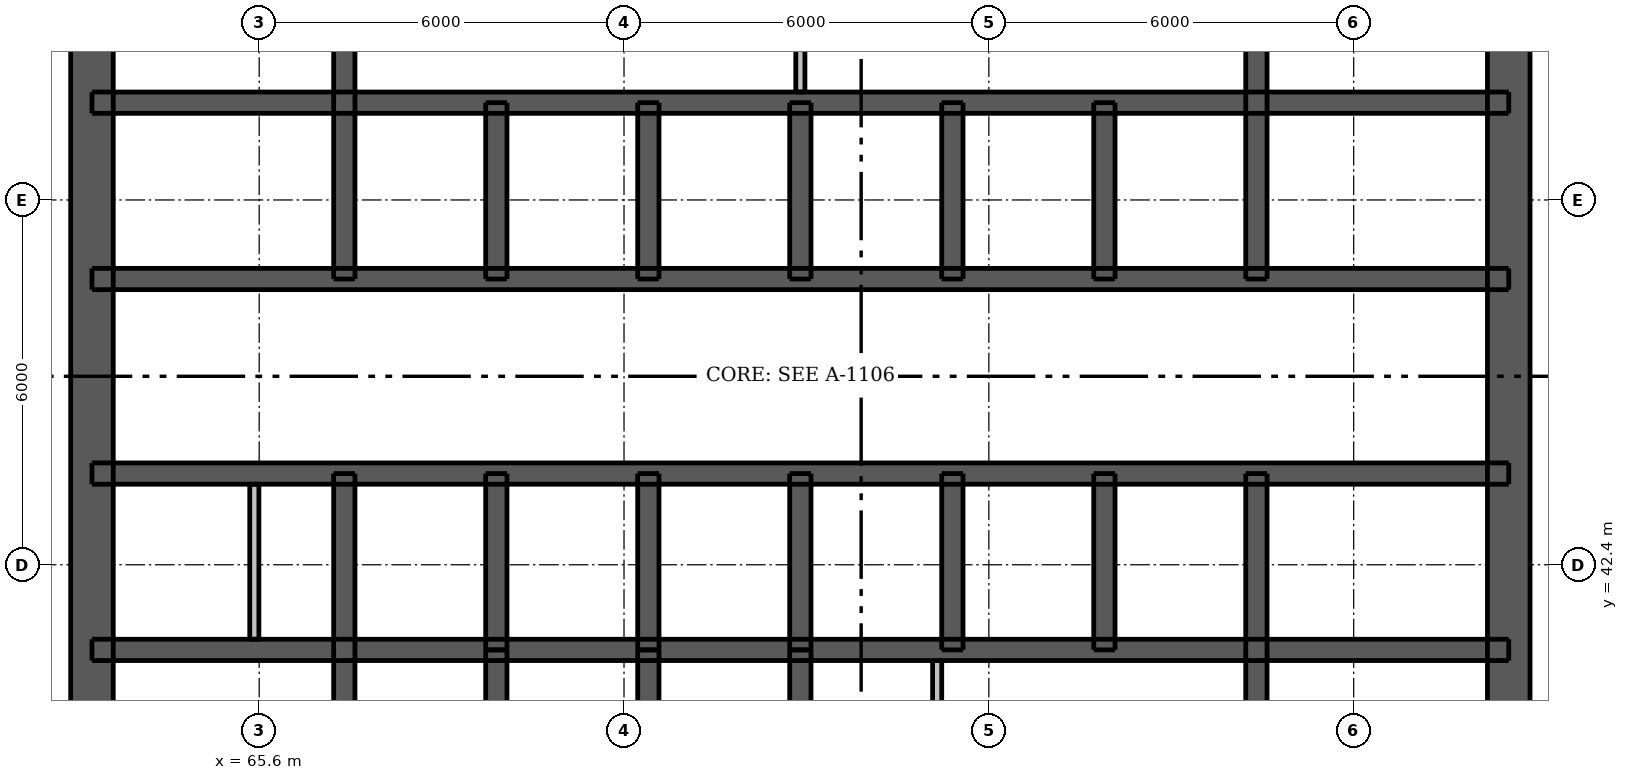
"""IFC4 building model, lengths in metres.
Left out: names, types, materials, properties, quantities, classifications, styles, units other than length and angle.
Written with IfcOpenShell. Run it as: python <this file> out.ifc"""

import sys

from ifc_helpers import new_model, si_unit, direction, frame, frame_2d, origin, place, context, subcontext, project, spatial, rectangle, extrude, element, fill, save


model = new_model("IFC4")
c1 = context("Model", 3, precision=1e-05, world=origin(), true_north=direction((0.0, 1.0)))
c2 = subcontext(c1, "Body", "Model", "MODEL_VIEW")
j1 = project(units=[si_unit("LENGTHUNIT", "METRE"), si_unit("PLANEANGLEUNIT", "RADIAN")], contexts=[c1])
p1 = place(None, origin())
s1 = spatial("IfcSite", under=j1, at=p1, CompositionType="ELEMENT")
p2 = place(p1, origin())
s2 = spatial("IfcBuilding", under=s1, at=p2, CompositionType="ELEMENT")
p3 = place(p2, frame((0.0, 0.0, 174.7)))
s3 = spatial("IfcBuildingStorey", under=s2, at=p3, CompositionType="ELEMENT", Elevation=174.7)
p4 = place(p3, frame((62.85, 33.5, 0.0), z_axis=(0.0, 0.0, 1.0), x_axis=(0.0, 1.0, 0.0)))
e1 = element("IfcWall", 1, at=p4, inside=s3, PredefinedType="SHEAR", context=c2, shape_type="SweptSolid", body=[
    extrude(rectangle(XDim=24.0, YDim=0.7, at=frame_2d((12.0, 0.0))), origin(), (0.0, 0.0, 1.0), 2.95),
])
p5 = place(p4, frame((11.2, 0.0, 0.0)))
e2 = element("IfcOpeningElement", 2, at=p5, cuts=e1, PredefinedType="OPENING", context=c2, shape_type="SweptSolid", body=[
    extrude(rectangle(XDim=1.6, YDim=2.1, at=frame_2d((0.8, 1.05))), frame((0.0, 0.36, 0.0), z_axis=(0.0, -1.0, 0.0), x_axis=(1.0, 0.0, 0.0)), (0.0, 0.0, 1.0), 0.72),
])
p6 = place(p3, frame((86.15, 33.5, 0.0), z_axis=(0.0, 0.0, 1.0), x_axis=(0.0, 1.0, 0.0)))
e3 = element("IfcWall", 3, at=p6, inside=s3, PredefinedType="SHEAR", context=c2, shape_type="SweptSolid", body=[
    extrude(rectangle(XDim=24.0, YDim=0.7, at=frame_2d((12.0, 0.0))), origin(), (0.0, 0.0, 1.0), 2.95),
])
p7 = place(p6, frame((11.2, 0.0, 0.0)))
e4 = element("IfcOpeningElement", 4, at=p7, cuts=e3, PredefinedType="OPENING", context=c2, shape_type="SweptSolid", body=[
    extrude(rectangle(XDim=1.6, YDim=2.1, at=frame_2d((0.8, 1.05))), frame((0.0, 0.36, 0.0), z_axis=(0.0, -1.0, 0.0), x_axis=(1.0, 0.0, 0.0)), (0.0, 0.0, 1.0), 0.72),
])
p8 = place(p3, frame((62.85, 41.0, 0.0), z_axis=(0.0, 0.0, 1.0), x_axis=(1.0, 0.0, 0.0)))
e5 = element("IfcWall", 5, at=p8, inside=s3, PredefinedType="SHEAR", context=c2, shape_type="SweptSolid", body=[
    extrude(rectangle(XDim=23.3, YDim=0.35, at=frame_2d((11.65, 0.0))), origin(), (0.0, 0.0, 1.0), 2.95),
])
p9 = place(p3, frame((62.85, 43.9, 0.0), z_axis=(0.0, 0.0, 1.0), x_axis=(1.0, 0.0, 0.0)))
e6 = element("IfcWall", 6, at=p9, inside=s3, PredefinedType="SHEAR", context=c2, shape_type="SweptSolid", body=[
    extrude(rectangle(XDim=23.3, YDim=0.35, at=frame_2d((11.65, 0.0))), origin(), (0.0, 0.0, 1.0), 2.95),
])
p10 = place(p9, frame((1.06, 0.0, 0.0)))
e7 = element("IfcOpeningElement", 7, at=p10, cuts=e6, PredefinedType="OPENING", context=c2, shape_type="SweptSolid", body=[
    extrude(rectangle(XDim=0.9, YDim=2.1, at=frame_2d((0.45, 1.05))), frame((0.0, 0.185, 0.0), z_axis=(0.0, -1.0, 0.0), x_axis=(1.0, 0.0, 0.0)), (0.0, 0.0, 1.0), 0.37),
])
p11 = place(p9, frame((2.923, 0.0, 0.0)))
e8 = element("IfcOpeningElement", 8, at=p11, cuts=e6, PredefinedType="OPENING", context=c2, shape_type="SweptSolid", body=[
    extrude(rectangle(XDim=0.8, YDim=2.1, at=frame_2d((0.4, 1.05))), frame((0.0, 0.185, 0.0), z_axis=(0.0, -1.0, 0.0), x_axis=(1.0, 0.0, 0.0)), (0.0, 0.0, 1.0), 0.37),
])
p12 = place(p9, frame((20.688, 0.0, 0.0)))
e9 = element("IfcOpeningElement", 9, at=p12, cuts=e6, PredefinedType="OPENING", context=c2, shape_type="SweptSolid", body=[
    extrude(rectangle(XDim=0.9, YDim=2.1, at=frame_2d((0.45, 1.05))), frame((0.0, 0.185, 0.0), z_axis=(0.0, -1.0, 0.0), x_axis=(1.0, 0.0, 0.0)), (0.0, 0.0, 1.0), 0.37),
])
p13 = place(p9, frame((4.95, 0.0, 0.0)))
e10 = element("IfcOpeningElement", 10, at=p13, cuts=e6, PredefinedType="OPENING", context=c2, shape_type="SweptSolid", body=[
    extrude(rectangle(XDim=0.9, YDim=2.1, at=frame_2d((0.45, 1.05))), frame((0.0, 0.185, 0.0), z_axis=(0.0, -1.0, 0.0), x_axis=(1.0, 0.0, 0.0)), (0.0, 0.0, 1.0), 0.37),
])
p14 = place(p9, frame((7.45, 0.0, 0.0)))
e11 = element("IfcOpeningElement", 11, at=p14, cuts=e6, PredefinedType="OPENING", context=c2, shape_type="SweptSolid", body=[
    extrude(rectangle(XDim=0.9, YDim=2.1, at=frame_2d((0.45, 1.05))), frame((0.0, 0.185, 0.0), z_axis=(0.0, -1.0, 0.0), x_axis=(1.0, 0.0, 0.0)), (0.0, 0.0, 1.0), 0.37),
])
p15 = place(p9, frame((12.45, 0.0, 0.0)))
e12 = element("IfcOpeningElement", 12, at=p15, cuts=e6, PredefinedType="OPENING", context=c2, shape_type="SweptSolid", body=[
    extrude(rectangle(XDim=0.9, YDim=2.1, at=frame_2d((0.45, 1.05))), frame((0.0, 0.185, 0.0), z_axis=(0.0, -1.0, 0.0), x_axis=(1.0, 0.0, 0.0)), (0.0, 0.0, 1.0), 0.37),
])
p16 = place(p9, frame((14.95, 0.0, 0.0)))
e13 = element("IfcOpeningElement", 13, at=p16, cuts=e6, PredefinedType="OPENING", context=c2, shape_type="SweptSolid", body=[
    extrude(rectangle(XDim=0.9, YDim=2.1, at=frame_2d((0.45, 1.05))), frame((0.0, 0.185, 0.0), z_axis=(0.0, -1.0, 0.0), x_axis=(1.0, 0.0, 0.0)), (0.0, 0.0, 1.0), 0.37),
])
p17 = place(p3, frame((62.85, 47.1, 0.0), z_axis=(0.0, 0.0, 1.0), x_axis=(1.0, 0.0, 0.0)))
e14 = element("IfcWall", 14, at=p17, inside=s3, PredefinedType="SHEAR", context=c2, shape_type="SweptSolid", body=[
    extrude(rectangle(XDim=23.3, YDim=0.35, at=frame_2d((11.65, 0.0))), origin(), (0.0, 0.0, 1.0), 2.95),
])
p18 = place(p17, frame((1.712, 0.0, 0.0)))
e15 = element("IfcOpeningElement", 15, at=p18, cuts=e14, PredefinedType="OPENING", context=c2, shape_type="SweptSolid", body=[
    extrude(rectangle(XDim=0.9, YDim=2.1, at=frame_2d((0.45, 1.05))), frame((0.0, 0.185, 0.0), z_axis=(0.0, -1.0, 0.0), x_axis=(1.0, 0.0, 0.0)), (0.0, 0.0, 1.0), 0.37),
])
p19 = place(p17, frame((20.688, 0.0, 0.0)))
e16 = element("IfcOpeningElement", 16, at=p19, cuts=e14, PredefinedType="OPENING", context=c2, shape_type="SweptSolid", body=[
    extrude(rectangle(XDim=0.9, YDim=2.1, at=frame_2d((0.45, 1.05))), frame((0.0, 0.185, 0.0), z_axis=(0.0, -1.0, 0.0), x_axis=(1.0, 0.0, 0.0)), (0.0, 0.0, 1.0), 0.37),
])
p20 = place(p17, frame((4.85, 0.0, 0.0)))
e17 = element("IfcOpeningElement", 17, at=p20, cuts=e14, PredefinedType="OPENING", context=c2, shape_type="SweptSolid", body=[
    extrude(rectangle(XDim=1.1, YDim=2.1, at=frame_2d((0.55, 1.05))), frame((0.0, 0.185, 0.0), z_axis=(0.0, -1.0, 0.0), x_axis=(1.0, 0.0, 0.0)), (0.0, 0.0, 1.0), 0.37),
])
p21 = place(p17, frame((7.35, 0.0, 0.0)))
e18 = element("IfcOpeningElement", 18, at=p21, cuts=e14, PredefinedType="OPENING", context=c2, shape_type="SweptSolid", body=[
    extrude(rectangle(XDim=1.1, YDim=2.1, at=frame_2d((0.55, 1.05))), frame((0.0, 0.185, 0.0), z_axis=(0.0, -1.0, 0.0), x_axis=(1.0, 0.0, 0.0)), (0.0, 0.0, 1.0), 0.37),
])
p22 = place(p17, frame((9.85, 0.0, 0.0)))
e19 = element("IfcOpeningElement", 19, at=p22, cuts=e14, PredefinedType="OPENING", context=c2, shape_type="SweptSolid", body=[
    extrude(rectangle(XDim=1.1, YDim=2.1, at=frame_2d((0.55, 1.05))), frame((0.0, 0.185, 0.0), z_axis=(0.0, -1.0, 0.0), x_axis=(1.0, 0.0, 0.0)), (0.0, 0.0, 1.0), 0.37),
])
p23 = place(p17, frame((12.35, 0.0, 0.0)))
e20 = element("IfcOpeningElement", 20, at=p23, cuts=e14, PredefinedType="OPENING", context=c2, shape_type="SweptSolid", body=[
    extrude(rectangle(XDim=1.1, YDim=2.1, at=frame_2d((0.55, 1.05))), frame((0.0, 0.185, 0.0), z_axis=(0.0, -1.0, 0.0), x_axis=(1.0, 0.0, 0.0)), (0.0, 0.0, 1.0), 0.37),
])
p24 = place(p17, frame((14.85, 0.0, 0.0)))
e21 = element("IfcOpeningElement", 21, at=p24, cuts=e14, PredefinedType="OPENING", context=c2, shape_type="SweptSolid", body=[
    extrude(rectangle(XDim=1.1, YDim=2.1, at=frame_2d((0.55, 1.05))), frame((0.0, 0.185, 0.0), z_axis=(0.0, -1.0, 0.0), x_axis=(1.0, 0.0, 0.0)), (0.0, 0.0, 1.0), 0.37),
])
p25 = place(p17, frame((17.35, 0.0, 0.0)))
e22 = element("IfcOpeningElement", 22, at=p25, cuts=e14, PredefinedType="OPENING", context=c2, shape_type="SweptSolid", body=[
    extrude(rectangle(XDim=1.1, YDim=2.1, at=frame_2d((0.55, 1.05))), frame((0.0, 0.185, 0.0), z_axis=(0.0, -1.0, 0.0), x_axis=(1.0, 0.0, 0.0)), (0.0, 0.0, 1.0), 0.37),
])
p26 = place(p3, frame((62.85, 50.0, 0.0), z_axis=(0.0, 0.0, 1.0), x_axis=(1.0, 0.0, 0.0)))
e23 = element("IfcWall", 23, at=p26, inside=s3, PredefinedType="SHEAR", context=c2, shape_type="SweptSolid", body=[
    extrude(rectangle(XDim=23.3, YDim=0.35, at=frame_2d((11.65, 0.0))), origin(), (0.0, 0.0, 1.0), 2.95),
])
p27 = place(p3, frame((67.0, 33.85, 0.0), z_axis=(0.0, 0.0, 1.0), x_axis=(0.0, 1.0, 0.0)))
e24 = element("IfcWall", 24, at=p27, inside=s3, PredefinedType="SHEAR", context=c2, shape_type="SweptSolid", body=[
    extrude(rectangle(XDim=10.05, YDim=0.35, at=frame_2d((5.025, 0.0))), origin(), (0.0, 0.0, 1.0), 2.95),
])
p28 = place(p27, frame((0.55, 0.0, 0.0)))
e25 = element("IfcOpeningElement", 25, at=p28, cuts=e24, PredefinedType="OPENING", context=c2, shape_type="SweptSolid", body=[
    extrude(rectangle(XDim=1.1, YDim=2.1, at=frame_2d((0.55, 1.05))), frame((0.0, 0.185, 0.0), z_axis=(0.0, -1.0, 0.0), x_axis=(1.0, 0.0, 0.0)), (0.0, 0.0, 1.0), 0.37),
])
for number, where, z_axis, x_axis in (
    (26, (67.0, 47.1, 0.0), (0.0, 0.0, 1.0), (0.0, 1.0, 0.0)),
    (27, (82.0, 33.85, 0.0), (0.0, 0.0, 1.0), (0.0, 1.0, 0.0)),
    (28, (82.0, 47.1, 0.0), (0.0, 0.0, 1.0), (0.0, 1.0, 0.0)),
):
    element("IfcWall", number, at=place(p3, frame(where, z_axis=z_axis, x_axis=x_axis)), inside=s3, PredefinedType="SHEAR", context=c2, shape_type="SweptSolid", body=[
        extrude(rectangle(XDim=10.05, YDim=0.35, at=frame_2d((5.025, 0.0))), origin(), (0.0, 0.0, 1.0), 2.95),
    ])
for number, where, z_axis, x_axis in (
    (29, (69.5, 41.0, 0.0), (0.0, 0.0, 1.0), (0.0, 1.0, 0.0)),
    (30, (69.5, 47.1, 0.0), (0.0, 0.0, 1.0), (0.0, 1.0, 0.0)),
    (31, (72.0, 41.0, 0.0), (0.0, 0.0, 1.0), (0.0, 1.0, 0.0)),
    (32, (72.0, 47.1, 0.0), (0.0, 0.0, 1.0), (0.0, 1.0, 0.0)),
    (33, (74.5, 41.0, 0.0), (0.0, 0.0, 1.0), (0.0, 1.0, 0.0)),
    (34, (74.5, 47.1, 0.0), (0.0, 0.0, 1.0), (0.0, 1.0, 0.0)),
    (35, (77.0, 41.0, 0.0), (0.0, 0.0, 1.0), (0.0, 1.0, 0.0)),
    (36, (77.0, 47.1, 0.0), (0.0, 0.0, 1.0), (0.0, 1.0, 0.0)),
    (37, (79.5, 41.0, 0.0), (0.0, 0.0, 1.0), (0.0, 1.0, 0.0)),
    (38, (79.5, 47.1, 0.0), (0.0, 0.0, 1.0), (0.0, 1.0, 0.0)),
    (39, (69.5, 38.1, 0.0), (0.0, 0.0, 1.0), (0.0, 1.0, 0.0)),
    (40, (72.0, 38.1, 0.0), (0.0, 0.0, 1.0), (0.0, 1.0, 0.0)),
    (41, (74.5, 38.1, 0.0), (0.0, 0.0, 1.0), (0.0, 1.0, 0.0)),
):
    element("IfcWall", number, at=place(p3, frame(where, z_axis=z_axis, x_axis=x_axis)), inside=s3, PredefinedType="SHEAR", context=c2, shape_type="SweptSolid", body=[
        extrude(rectangle(XDim=2.9, YDim=0.35, at=frame_2d((1.45, 0.0))), origin(), (0.0, 0.0, 1.0), 2.95),
    ])
p29 = place(p3, frame((76.75, 34.2, 0.0), z_axis=(0.0, 0.0, 1.0), x_axis=(0.0, 1.0, 0.0)))
e42 = element("IfcWall", 42, at=p29, inside=s3, PredefinedType="PLUMBINGWALL", context=c2, shape_type="SweptSolid", body=[
    extrude(rectangle(XDim=6.625, YDim=0.15, at=frame_2d((3.312, 0.0))), origin(), (0.0, 0.0, 1.0), 2.95),
])
p30 = place(p3, frame((65.52, 41.175, 0.0), z_axis=(0.0, 0.0, 1.0), x_axis=(0.0, 1.0, 0.0)))
e43 = element("IfcWall", 43, at=p30, inside=s3, PredefinedType="PLUMBINGWALL", context=c2, shape_type="SweptSolid", body=[
    extrude(rectangle(XDim=2.55, YDim=0.15, at=frame_2d((1.275, 0.0))), origin(), (0.0, 0.0, 1.0), 2.95),
])
p31 = place(p3, frame((74.5, 50.175, 0.0), z_axis=(0.0, 0.0, 1.0), x_axis=(0.0, 1.0, 0.0)))
e44 = element("IfcWall", 44, at=p31, inside=s3, PredefinedType="PLUMBINGWALL", context=c2, shape_type="SweptSolid", body=[
    extrude(rectangle(XDim=6.625, YDim=0.15, at=frame_2d((3.312, 0.0))), origin(), (0.0, 0.0, 1.0), 2.95),
])
p32 = place(p5, origin())
e45 = element("IfcDoor", 45, at=p32, inside=s3, OperationType="DOUBLE_DOOR_SINGLE_SWING", PredefinedType="DOOR", context=c2, shape_type="SweptSolid", body=[
    extrude(rectangle(XDim=1.6, YDim=2.1, at=frame_2d((0.8, 1.05))), frame((0.0, -0.288, 0.0), z_axis=(0.0, -1.0, 0.0), x_axis=(1.0, 0.0, 0.0)), (0.0, 0.0, 1.0), 0.05),
])
fill(e2, e45)
p33 = place(p7, origin())
e46 = element("IfcDoor", 46, at=p33, inside=s3, OperationType="DOUBLE_DOOR_SINGLE_SWING", PredefinedType="DOOR", context=c2, shape_type="SweptSolid", body=[
    extrude(rectangle(XDim=1.6, YDim=2.1, at=frame_2d((0.8, 1.05))), frame((0.0, 0.337, 0.0), z_axis=(0.0, -1.0, 0.0), x_axis=(1.0, 0.0, 0.0)), (0.0, 0.0, 1.0), 0.05),
])
fill(e4, e46)
p34 = place(p10, origin())
e47 = element("IfcDoor", 47, at=p34, inside=s3, OperationType="SINGLE_SWING_LEFT", PredefinedType="DOOR", context=c2, shape_type="SweptSolid", body=[
    extrude(rectangle(XDim=0.9, YDim=2.1, at=frame_2d((0.45, 1.05))), frame((0.0, -0.112, 0.0), z_axis=(0.0, -1.0, 0.0), x_axis=(1.0, 0.0, 0.0)), (0.0, 0.0, 1.0), 0.05),
])
fill(e7, e47)
p35 = place(p11, origin())
e48 = element("IfcDoor", 48, at=p35, inside=s3, OperationType="SINGLE_SWING_RIGHT", PredefinedType="DOOR", context=c2, shape_type="SweptSolid", body=[
    extrude(rectangle(XDim=0.8, YDim=2.1, at=frame_2d((0.4, 1.05))), frame((0.0, -0.112, 0.0), z_axis=(0.0, -1.0, 0.0), x_axis=(1.0, 0.0, 0.0)), (0.0, 0.0, 1.0), 0.05),
])
fill(e8, e48)
p36 = place(p12, origin())
e49 = element("IfcDoor", 49, at=p36, inside=s3, OperationType="SINGLE_SWING_LEFT", PredefinedType="DOOR", context=c2, shape_type="SweptSolid", body=[
    extrude(rectangle(XDim=0.9, YDim=2.1, at=frame_2d((0.45, 1.05))), frame((0.0, -0.112, 0.0), z_axis=(0.0, -1.0, 0.0), x_axis=(1.0, 0.0, 0.0)), (0.0, 0.0, 1.0), 0.05),
])
fill(e9, e49)
p37 = place(p18, origin())
e50 = element("IfcDoor", 50, at=p37, inside=s3, OperationType="SINGLE_SWING_LEFT", PredefinedType="DOOR", context=c2, shape_type="SweptSolid", body=[
    extrude(rectangle(XDim=0.9, YDim=2.1, at=frame_2d((0.45, 1.05))), frame((0.0, 0.163, 0.0), z_axis=(0.0, -1.0, 0.0), x_axis=(1.0, 0.0, 0.0)), (0.0, 0.0, 1.0), 0.05),
])
fill(e15, e50)
p38 = place(p19, origin())
e51 = element("IfcDoor", 51, at=p38, inside=s3, OperationType="SINGLE_SWING_LEFT", PredefinedType="DOOR", context=c2, shape_type="SweptSolid", body=[
    extrude(rectangle(XDim=0.9, YDim=2.1, at=frame_2d((0.45, 1.05))), frame((0.0, 0.163, 0.0), z_axis=(0.0, -1.0, 0.0), x_axis=(1.0, 0.0, 0.0)), (0.0, 0.0, 1.0), 0.05),
])
fill(e16, e51)
p39 = place(p13, origin())
e52 = element("IfcDoor", 52, at=p39, inside=s3, OperationType="SINGLE_SWING_RIGHT", PredefinedType="DOOR", context=c2, shape_type="SweptSolid", body=[
    extrude(rectangle(XDim=0.9, YDim=2.1, at=frame_2d((0.45, 1.05))), frame((0.0, -0.112, 0.0), z_axis=(0.0, -1.0, 0.0), x_axis=(1.0, 0.0, 0.0)), (0.0, 0.0, 1.0), 0.05),
])
fill(e10, e52)
p40 = place(p14, origin())
e53 = element("IfcDoor", 53, at=p40, inside=s3, OperationType="SINGLE_SWING_LEFT", PredefinedType="DOOR", context=c2, shape_type="SweptSolid", body=[
    extrude(rectangle(XDim=0.9, YDim=2.1, at=frame_2d((0.45, 1.05))), frame((0.0, -0.112, 0.0), z_axis=(0.0, -1.0, 0.0), x_axis=(1.0, 0.0, 0.0)), (0.0, 0.0, 1.0), 0.05),
])
fill(e11, e53)
p41 = place(p15, origin())
e54 = element("IfcDoor", 54, at=p41, inside=s3, OperationType="SINGLE_SWING_LEFT", PredefinedType="DOOR", context=c2, shape_type="SweptSolid", body=[
    extrude(rectangle(XDim=0.9, YDim=2.1, at=frame_2d((0.45, 1.05))), frame((0.0, -0.112, 0.0), z_axis=(0.0, -1.0, 0.0), x_axis=(1.0, 0.0, 0.0)), (0.0, 0.0, 1.0), 0.05),
])
fill(e12, e54)
p42 = place(p16, origin())
e55 = element("IfcDoor", 55, at=p42, inside=s3, OperationType="SINGLE_SWING_RIGHT", PredefinedType="DOOR", context=c2, shape_type="SweptSolid", body=[
    extrude(rectangle(XDim=0.9, YDim=2.1, at=frame_2d((0.45, 1.05))), frame((0.0, -0.112, 0.0), z_axis=(0.0, -1.0, 0.0), x_axis=(1.0, 0.0, 0.0)), (0.0, 0.0, 1.0), 0.05),
])
fill(e13, e55)
p43 = place(p20, origin())
e56 = element("IfcDoor", 56, at=p43, inside=s3, OperationType="DOUBLE_DOOR_SLIDING", PredefinedType="DOOR", context=c2, shape_type="SweptSolid", body=[
    extrude(rectangle(XDim=1.1, YDim=2.1, at=frame_2d((0.55, 1.05))), frame((0.0, 0.025, 0.0), z_axis=(0.0, -1.0, 0.0), x_axis=(1.0, 0.0, 0.0)), (0.0, 0.0, 1.0), 0.05),
])
fill(e17, e56)
p44 = place(p21, origin())
e57 = element("IfcDoor", 57, at=p44, inside=s3, OperationType="DOUBLE_DOOR_SLIDING", PredefinedType="DOOR", context=c2, shape_type="SweptSolid", body=[
    extrude(rectangle(XDim=1.1, YDim=2.1, at=frame_2d((0.55, 1.05))), frame((0.0, 0.025, 0.0), z_axis=(0.0, -1.0, 0.0), x_axis=(1.0, 0.0, 0.0)), (0.0, 0.0, 1.0), 0.05),
])
fill(e18, e57)
p45 = place(p22, origin())
e58 = element("IfcDoor", 58, at=p45, inside=s3, OperationType="DOUBLE_DOOR_SLIDING", PredefinedType="DOOR", context=c2, shape_type="SweptSolid", body=[
    extrude(rectangle(XDim=1.1, YDim=2.1, at=frame_2d((0.55, 1.05))), frame((0.0, 0.025, 0.0), z_axis=(0.0, -1.0, 0.0), x_axis=(1.0, 0.0, 0.0)), (0.0, 0.0, 1.0), 0.05),
])
fill(e19, e58)
p46 = place(p23, origin())
e59 = element("IfcDoor", 59, at=p46, inside=s3, OperationType="DOUBLE_DOOR_SLIDING", PredefinedType="DOOR", context=c2, shape_type="SweptSolid", body=[
    extrude(rectangle(XDim=1.1, YDim=2.1, at=frame_2d((0.55, 1.05))), frame((0.0, 0.025, 0.0), z_axis=(0.0, -1.0, 0.0), x_axis=(1.0, 0.0, 0.0)), (0.0, 0.0, 1.0), 0.05),
])
fill(e20, e59)
p47 = place(p24, origin())
e60 = element("IfcDoor", 60, at=p47, inside=s3, OperationType="DOUBLE_DOOR_SLIDING", PredefinedType="DOOR", context=c2, shape_type="SweptSolid", body=[
    extrude(rectangle(XDim=1.1, YDim=2.1, at=frame_2d((0.55, 1.05))), frame((0.0, 0.025, 0.0), z_axis=(0.0, -1.0, 0.0), x_axis=(1.0, 0.0, 0.0)), (0.0, 0.0, 1.0), 0.05),
])
fill(e21, e60)
p48 = place(p25, origin())
e61 = element("IfcDoor", 61, at=p48, inside=s3, OperationType="DOUBLE_DOOR_SLIDING", PredefinedType="DOOR", context=c2, shape_type="SweptSolid", body=[
    extrude(rectangle(XDim=1.1, YDim=2.1, at=frame_2d((0.55, 1.05))), frame((0.0, 0.025, 0.0), z_axis=(0.0, -1.0, 0.0), x_axis=(1.0, 0.0, 0.0)), (0.0, 0.0, 1.0), 0.05),
])
fill(e22, e61)
save(model, sys.argv[1])
